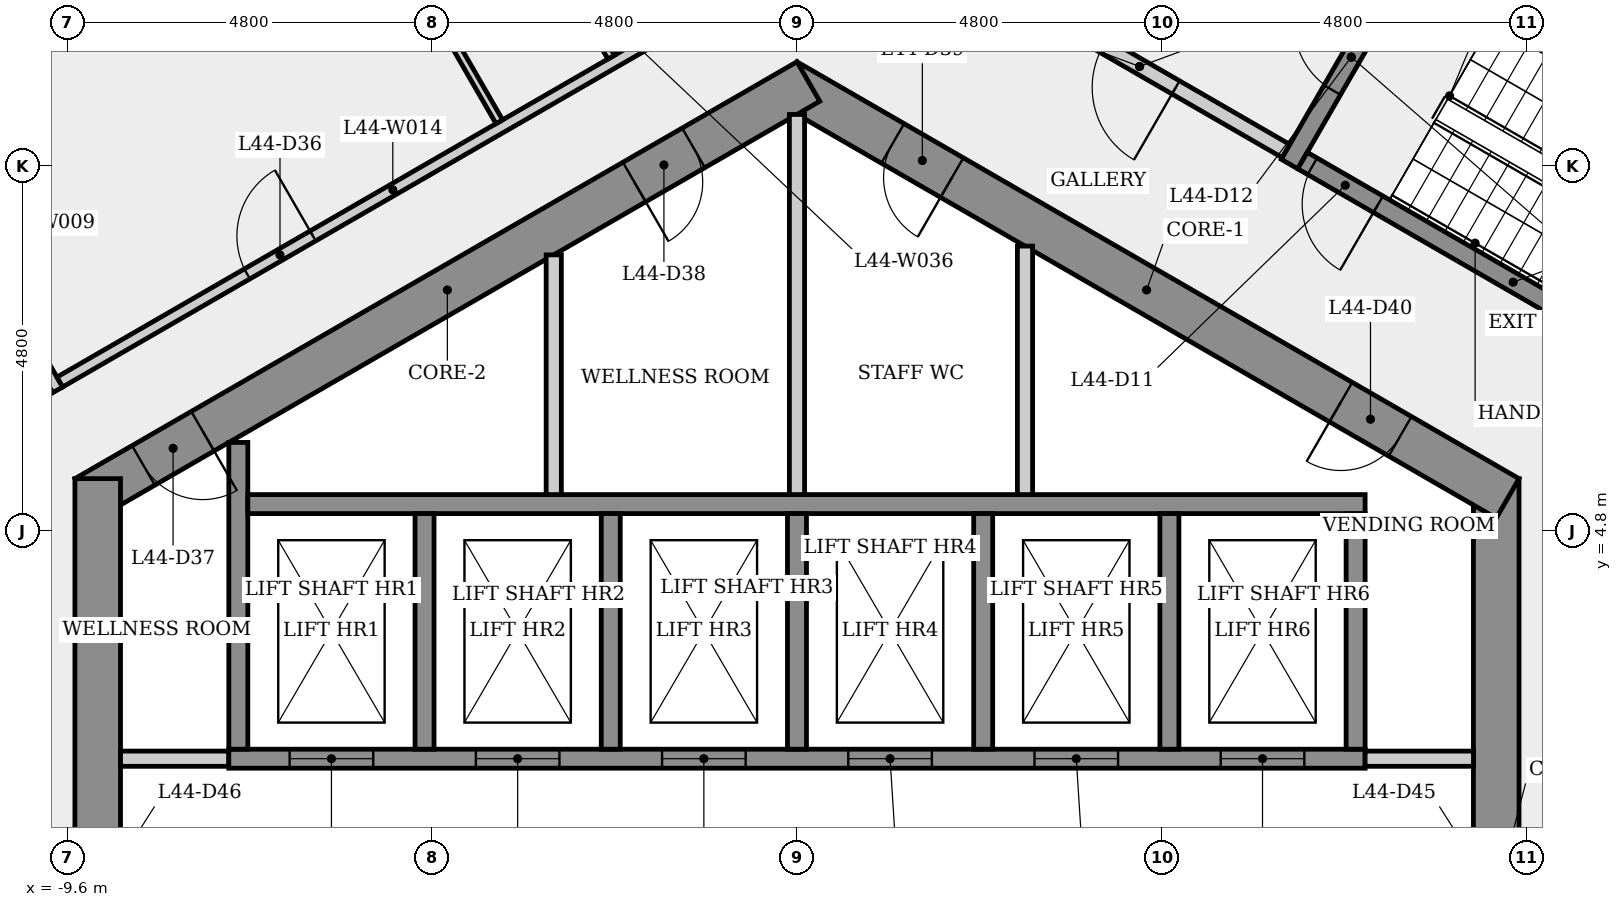
"""IFC4 building model, lengths in metres.
Left out: names, types, materials, properties, quantities, classifications, styles, units other than length and angle.
Written with IfcOpenShell. Run it as: python <this file> out.ifc"""

import sys

from ifc_helpers import new_model, si_unit, direction, frame, frame_2d, origin, place, context, subcontext, project, spatial, rectangle, extrude, element, fill, save


model = new_model("IFC4")
c1 = context("Model", 3, precision=1e-05, world=origin(), true_north=direction((0.0, 1.0)))
c2 = subcontext(c1, "Body", "Model", "MODEL_VIEW")
j1 = project(units=[si_unit("LENGTHUNIT", "METRE"), si_unit("PLANEANGLEUNIT", "RADIAN")], contexts=[c1])
p1 = place(None, origin())
s1 = spatial("IfcSite", under=j1, at=p1, CompositionType="ELEMENT")
p2 = place(p1, origin())
s2 = spatial("IfcBuilding", under=s1, at=p2, CompositionType="ELEMENT")
p3 = place(p2, frame((0.0, 0.0, 166.3)))
s3 = spatial("IfcBuildingStorey", under=s2, at=p3, CompositionType="ELEMENT", Elevation=166.3)
p4 = place(p3, frame((9.2, -5.485, 0.0), z_axis=(0.0, 0.0, 1.0), x_axis=(0.0, 1.0, 0.0)))
e1 = element("IfcWall", 1, at=p4, inside=s3, PredefinedType="SHEAR", context=c2, shape_type="SweptSolid", body=[
    extrude(rectangle(XDim=10.97, YDim=0.6, at=frame_2d((5.485, 0.0))), origin(), (0.0, 0.0, 1.0), 3.4),
])
p5 = place(p4, frame((4.685, 0.0, 0.0)))
e2 = element("IfcOpeningElement", 2, at=p5, cuts=e1, PredefinedType="OPENING", context=c2, shape_type="SweptSolid", body=[
    extrude(rectangle(XDim=1.6, YDim=2.1, at=frame_2d((0.8, 1.05))), frame((0.0, 0.31, 0.0), z_axis=(0.0, -1.0, 0.0), x_axis=(1.0, 0.0, 0.0)), (0.0, 0.0, 1.0), 0.62),
])
p6 = place(p3, frame((9.35, 5.225, 0.0), z_axis=(0.0, 0.0, 1.0), x_axis=(-0.866023993627, 0.500002442456, 0.0)))
e3 = element("IfcWall", 3, at=p6, inside=s3, PredefinedType="SHEAR", context=c2, shape_type="SweptSolid", body=[
    extrude(rectangle(XDim=10.97, YDim=0.6, at=frame_2d((5.485, 0.0))), origin(), (0.0, 0.0, 1.0), 3.4),
])
p7 = place(p6, frame((8.442, 0.0, 0.0)))
e4 = element("IfcOpeningElement", 4, at=p7, cuts=e3, PredefinedType="OPENING", context=c2, shape_type="SweptSolid", body=[
    extrude(rectangle(XDim=0.9, YDim=2.1, at=frame_2d((0.45, 1.05))), frame((0.0, 0.31, 0.0), z_axis=(0.0, -1.0, 0.0), x_axis=(1.0, 0.0, 0.0)), (0.0, 0.0, 1.0), 0.62),
])
p8 = place(p6, frame((1.634, 0.0, 0.0)))
e5 = element("IfcOpeningElement", 5, at=p8, cuts=e3, PredefinedType="OPENING", context=c2, shape_type="SweptSolid", body=[
    extrude(rectangle(XDim=0.9, YDim=2.1, at=frame_2d((0.45, 1.05))), frame((0.0, 0.31, 0.0), z_axis=(0.0, -1.0, 0.0), x_axis=(1.0, 0.0, 0.0)), (0.0, 0.0, 1.0), 0.62),
])
p9 = place(p3, frame((0.15, 10.71, 0.0), z_axis=(0.0, 0.0, 1.0), x_axis=(-0.866023993627, -0.500002442456, 0.0)))
e6 = element("IfcWall", 6, at=p9, inside=s3, PredefinedType="SHEAR", context=c2, shape_type="SweptSolid", body=[
    extrude(rectangle(XDim=10.97, YDim=0.6, at=frame_2d((5.485, 0.0))), origin(), (0.0, 0.0, 1.0), 3.4),
])
p10 = place(p9, frame((9.201, 0.0, 0.0)))
e7 = element("IfcOpeningElement", 7, at=p10, cuts=e6, PredefinedType="OPENING", context=c2, shape_type="SweptSolid", body=[
    extrude(rectangle(XDim=0.9, YDim=2.1, at=frame_2d((0.45, 1.05))), frame((0.0, 0.31, 0.0), z_axis=(0.0, -1.0, 0.0), x_axis=(1.0, 0.0, 0.0)), (0.0, 0.0, 1.0), 0.62),
])
p11 = place(p9, frame((1.744, 0.0, 0.0)))
e8 = element("IfcOpeningElement", 8, at=p11, cuts=e6, PredefinedType="OPENING", context=c2, shape_type="SweptSolid", body=[
    extrude(rectangle(XDim=0.9, YDim=2.1, at=frame_2d((0.45, 1.05))), frame((0.0, 0.31, 0.0), z_axis=(0.0, -1.0, 0.0), x_axis=(1.0, 0.0, 0.0)), (0.0, 0.0, 1.0), 0.62),
])
p12 = place(p3, frame((-9.2, 5.485, 0.0), z_axis=(0.0, 0.0, 1.0), x_axis=(0.0, -1.0, 0.0)))
e9 = element("IfcWall", 9, at=p12, inside=s3, PredefinedType="SHEAR", context=c2, shape_type="SweptSolid", body=[
    extrude(rectangle(XDim=10.97, YDim=0.6, at=frame_2d((5.485, 0.0))), origin(), (0.0, 0.0, 1.0), 3.4),
])
p13 = place(p12, frame((8.516, 0.0, 0.0)))
e10 = element("IfcOpeningElement", 10, at=p13, cuts=e9, PredefinedType="OPENING", context=c2, shape_type="SweptSolid", body=[
    extrude(rectangle(XDim=0.9, YDim=2.1, at=frame_2d((0.45, 1.05))), frame((0.0, 0.31, 0.0), z_axis=(0.0, -1.0, 0.0), x_axis=(1.0, 0.0, 0.0)), (0.0, 0.0, 1.0), 0.62),
])
p14 = place(p12, frame((4.685, 0.0, 0.0)))
e11 = element("IfcOpeningElement", 11, at=p14, cuts=e9, PredefinedType="OPENING", context=c2, shape_type="SweptSolid", body=[
    extrude(rectangle(XDim=1.6, YDim=2.1, at=frame_2d((0.8, 1.05))), frame((0.0, 0.31, 0.0), z_axis=(0.0, -1.0, 0.0), x_axis=(1.0, 0.0, 0.0)), (0.0, 0.0, 1.0), 0.62),
])
p15 = place(p3, frame((-12.257, 11.038, 0.0), z_axis=(0.0, 0.0, 1.0), x_axis=(0.499997969693, -0.866026575979, 0.0)))
e12 = element("IfcWall", 12, at=p15, inside=s3, PredefinedType="PARTITIONING", context=c2, shape_type="SweptSolid", body=[
    extrude(rectangle(XDim=5.062, YDim=0.15, at=frame_2d((2.531, 0.0))), origin(), (0.0, 0.0, 1.0), 3.05),
])
p16 = place(p3, frame((-9.698, 6.756, 0.0), z_axis=(0.0, 0.0, 1.0), x_axis=(0.866026460776, 0.499998169232, 0.0)))
e13 = element("IfcWall", 13, at=p16, inside=s3, PredefinedType="PARTITIONING", context=c2, shape_type="SweptSolid", body=[
    extrude(rectangle(XDim=10.118, YDim=0.15, at=frame_2d((5.059, 0.0))), origin(), (0.0, 0.0, 1.0), 3.05),
])
p17 = place(p16, frame((2.845, 0.0, 0.0)))
e14 = element("IfcOpeningElement", 14, at=p17, cuts=e13, PredefinedType="OPENING", context=c2, shape_type="SweptSolid", body=[
    extrude(rectangle(XDim=1.0, YDim=2.1, at=frame_2d((0.5, 1.05))), frame((0.0, 0.085, 0.0), z_axis=(0.0, -1.0, 0.0), x_axis=(1.0, 0.0, 0.0)), (0.0, 0.0, 1.0), 0.17),
])
p18 = place(p3, frame((-8.9, 1.8, 0.0), z_axis=(0.0, 0.0, 1.0), x_axis=(1.0, 0.0, 0.0)))
e15 = element("IfcWall", 15, at=p18, inside=s3, PredefinedType="PARTITIONING", context=c2, shape_type="SweptSolid", body=[
    extrude(rectangle(XDim=1.425, YDim=0.2, at=frame_2d((0.712, 0.0))), origin(), (0.0, 0.0, 1.0), 3.05),
])
p19 = place(p3, frame((-7.475, 1.8, 0.0), z_axis=(0.0, 0.0, 1.0), x_axis=(1.0, 0.0, 0.0)))
e16 = element("IfcWall", 16, at=p19, inside=s3, PredefinedType="SHEAR", context=c2, shape_type="SweptSolid", body=[
    extrude(rectangle(XDim=14.95, YDim=0.25, at=frame_2d((7.475, 0.0))), origin(), (0.0, 0.0, 1.0), 3.05),
])
p20 = place(p19, frame((0.8, 0.0, 0.0)))
e17 = element("IfcOpeningElement", 17, at=p20, cuts=e16, PredefinedType="OPENING", context=c2, shape_type="SweptSolid", body=[
    extrude(rectangle(XDim=1.1, YDim=2.1, at=frame_2d((0.55, 1.05))), frame((0.0, 0.135, 0.0), z_axis=(0.0, -1.0, 0.0), x_axis=(1.0, 0.0, 0.0)), (0.0, 0.0, 1.0), 0.27),
])
p21 = place(p19, frame((3.25, 0.0, 0.0)))
e18 = element("IfcOpeningElement", 18, at=p21, cuts=e16, PredefinedType="OPENING", context=c2, shape_type="SweptSolid", body=[
    extrude(rectangle(XDim=1.1, YDim=2.1, at=frame_2d((0.55, 1.05))), frame((0.0, 0.135, 0.0), z_axis=(0.0, -1.0, 0.0), x_axis=(1.0, 0.0, 0.0)), (0.0, 0.0, 1.0), 0.27),
])
p22 = place(p19, frame((5.7, 0.0, 0.0)))
e19 = element("IfcOpeningElement", 19, at=p22, cuts=e16, PredefinedType="OPENING", context=c2, shape_type="SweptSolid", body=[
    extrude(rectangle(XDim=1.1, YDim=2.1, at=frame_2d((0.55, 1.05))), frame((0.0, 0.135, 0.0), z_axis=(0.0, -1.0, 0.0), x_axis=(1.0, 0.0, 0.0)), (0.0, 0.0, 1.0), 0.27),
])
p23 = place(p19, frame((8.15, 0.0, 0.0)))
e20 = element("IfcOpeningElement", 20, at=p23, cuts=e16, PredefinedType="OPENING", context=c2, shape_type="SweptSolid", body=[
    extrude(rectangle(XDim=1.1, YDim=2.1, at=frame_2d((0.55, 1.05))), frame((0.0, 0.135, 0.0), z_axis=(0.0, -1.0, 0.0), x_axis=(1.0, 0.0, 0.0)), (0.0, 0.0, 1.0), 0.27),
])
p24 = place(p19, frame((10.6, 0.0, 0.0)))
e21 = element("IfcOpeningElement", 21, at=p24, cuts=e16, PredefinedType="OPENING", context=c2, shape_type="SweptSolid", body=[
    extrude(rectangle(XDim=1.1, YDim=2.1, at=frame_2d((0.55, 1.05))), frame((0.0, 0.135, 0.0), z_axis=(0.0, -1.0, 0.0), x_axis=(1.0, 0.0, 0.0)), (0.0, 0.0, 1.0), 0.27),
])
p25 = place(p19, frame((13.05, 0.0, 0.0)))
e22 = element("IfcOpeningElement", 22, at=p25, cuts=e16, PredefinedType="OPENING", context=c2, shape_type="SweptSolid", body=[
    extrude(rectangle(XDim=1.1, YDim=2.1, at=frame_2d((0.55, 1.05))), frame((0.0, 0.135, 0.0), z_axis=(0.0, -1.0, 0.0), x_axis=(1.0, 0.0, 0.0)), (0.0, 0.0, 1.0), 0.27),
])
p26 = place(p3, frame((-7.35, 1.925, 0.0), z_axis=(0.0, 0.0, 1.0), x_axis=(0.0, 1.0, 0.0)))
e23 = element("IfcWall", 23, at=p26, inside=s3, PredefinedType="SHEAR", context=c2, shape_type="SweptSolid", body=[
    extrude(rectangle(XDim=4.036, YDim=0.25, at=frame_2d((2.018, 0.0))), origin(), (0.0, 0.0, 1.0), 3.05),
])
p27 = place(p3, frame((-7.225, 5.15, 0.0), z_axis=(0.0, 0.0, 1.0), x_axis=(1.0, 0.0, 0.0)))
e24 = element("IfcWall", 24, at=p27, inside=s3, PredefinedType="SHEAR", context=c2, shape_type="SweptSolid", body=[
    extrude(rectangle(XDim=14.7, YDim=0.25, at=frame_2d((7.35, 0.0))), origin(), (0.0, 0.0, 1.0), 3.05),
])
p28 = place(p3, frame((-4.9, 5.025, 0.0), z_axis=(0.0, 0.0, 1.0), x_axis=(0.0, -1.0, 0.0)))
e25 = element("IfcWall", 25, at=p28, inside=s3, PredefinedType="SHEAR", context=c2, shape_type="SweptSolid", body=[
    extrude(rectangle(XDim=3.1, YDim=0.25, at=frame_2d((1.55, 0.0))), origin(), (0.0, 0.0, 1.0), 3.4),
])
p29 = place(p3, frame((-3.916, 10.181, 0.0), z_axis=(0.0, 0.0, 1.0), x_axis=(-0.500011399757, 0.866018822032, 0.0)))
e26 = element("IfcWall", 26, at=p29, inside=s3, PredefinedType="PARTITIONING", context=c2, shape_type="SweptSolid", body=[
    extrude(rectangle(XDim=7.411, YDim=0.1, at=frame_2d((3.706, 0.0))), origin(), (0.0, 0.0, 1.0), 3.05),
])
p30 = place(p3, frame((-3.632, 13.088, 0.0), z_axis=(0.0, 0.0, 1.0), x_axis=(0.499986429846, -0.866033238375, 0.0)))
e27 = element("IfcWall", 27, at=p30, inside=s3, PredefinedType="PARTITIONING", context=c2, shape_type="SweptSolid", body=[
    extrude(rectangle(XDim=2.375, YDim=0.1, at=frame_2d((1.188, 0.0))), origin(), (0.0, 0.0, 1.0), 3.05),
])
p31 = place(p30, frame((0.812, 0.0, 0.0)))
e28 = element("IfcOpeningElement", 28, at=p31, cuts=e27, PredefinedType="OPENING", context=c2, shape_type="SweptSolid", body=[
    extrude(rectangle(XDim=0.8, YDim=2.1, at=frame_2d((0.4, 1.05))), frame((0.0, 0.06, 0.0), z_axis=(0.0, -1.0, 0.0), x_axis=(1.0, 0.0, 0.0)), (0.0, 0.0, 1.0), 0.12),
])
p32 = place(p3, frame((-3.2, 8.429, 0.0), z_axis=(0.0, 0.0, 1.0), x_axis=(0.0, -1.0, 0.0)))
e29 = element("IfcWall", 29, at=p32, inside=s3, PredefinedType="PARTITIONING", context=c2, shape_type="SweptSolid", body=[
    extrude(rectangle(XDim=3.154, YDim=0.2, at=frame_2d((1.577, 0.0))), origin(), (0.0, 0.0, 1.0), 3.05),
])
for number, where, z_axis, x_axis in (
    (30, (-2.45, 5.025, 0.0), (0.0, 0.0, 1.0), (0.0, -1.0, 0.0)),
    (31, (0.0, 5.025, 0.0), (0.0, 0.0, 1.0), (0.0, -1.0, 0.0)),
):
    element("IfcWall", number, at=place(p3, frame(where, z_axis=z_axis, x_axis=x_axis)), inside=s3, PredefinedType="SHEAR", context=c2, shape_type="SweptSolid", body=[
        extrude(rectangle(XDim=3.1, YDim=0.25, at=frame_2d((1.55, 0.0))), origin(), (0.0, 0.0, 1.0), 3.4),
    ])
p33 = place(p3, frame((0.0, 10.277, 0.0), z_axis=(0.0, 0.0, 1.0), x_axis=(0.0, -1.0, 0.0)))
e32 = element("IfcWall", 32, at=p33, inside=s3, PredefinedType="PARTITIONING", context=c2, shape_type="SweptSolid", body=[
    extrude(rectangle(XDim=5.002, YDim=0.2, at=frame_2d((2.501, 0.0))), origin(), (0.0, 0.0, 1.0), 3.05),
])
p34 = place(p3, frame((2.45, 5.025, 0.0), z_axis=(0.0, 0.0, 1.0), x_axis=(0.0, -1.0, 0.0)))
e33 = element("IfcWall", 33, at=p34, inside=s3, PredefinedType="SHEAR", context=c2, shape_type="SweptSolid", body=[
    extrude(rectangle(XDim=3.1, YDim=0.25, at=frame_2d((1.55, 0.0))), origin(), (0.0, 0.0, 1.0), 3.4),
])
p35 = place(p3, frame((3.0, 8.545, 0.0), z_axis=(0.0, 0.0, 1.0), x_axis=(0.0, -1.0, 0.0)))
e34 = element("IfcWall", 34, at=p35, inside=s3, PredefinedType="PARTITIONING", context=c2, shape_type="SweptSolid", body=[
    extrude(rectangle(XDim=3.27, YDim=0.2, at=frame_2d((1.635, 0.0))), origin(), (0.0, 0.0, 1.0), 3.05),
])
p36 = place(p3, frame((4.9, 5.025, 0.0), z_axis=(0.0, 0.0, 1.0), x_axis=(0.0, -1.0, 0.0)))
e35 = element("IfcWall", 35, at=p36, inside=s3, PredefinedType="SHEAR", context=c2, shape_type="SweptSolid", body=[
    extrude(rectangle(XDim=3.1, YDim=0.25, at=frame_2d((1.55, 0.0))), origin(), (0.0, 0.0, 1.0), 3.4),
])
p37 = place(p3, frame((6.435, 9.795, 0.0), z_axis=(0.0, 0.0, 1.0), x_axis=(-0.866012907634, 0.500021643343, 0.0)))
e36 = element("IfcWall", 36, at=p37, inside=s3, PredefinedType="PARTITIONING", context=c2, shape_type="SweptSolid", body=[
    extrude(rectangle(XDim=4.45, YDim=0.2, at=frame_2d((2.225, 0.0))), origin(), (0.0, 0.0, 1.0), 3.05),
])
p38 = place(p37, frame((1.675, 0.0, 0.0)))
e37 = element("IfcOpeningElement", 37, at=p38, cuts=e36, PredefinedType="OPENING", context=c2, shape_type="SweptSolid", body=[
    extrude(rectangle(XDim=1.1, YDim=2.1, at=frame_2d((0.55, 1.05))), frame((0.0, 0.11, 0.0), z_axis=(0.0, -1.0, 0.0), x_axis=(1.0, 0.0, 0.0)), (0.0, 0.0, 1.0), 0.22),
])
p39 = place(p3, frame((6.48, 9.624, 0.0), z_axis=(0.0, 0.0, 1.0), x_axis=(0.500017246033, 0.866015446554, 0.0)))
e38 = element("IfcWall", 38, at=p39, inside=s3, PredefinedType="SHEAR", context=c2, shape_type="SweptSolid", body=[
    extrude(rectangle(XDim=3.25, YDim=0.25, at=frame_2d((1.625, 0.0))), origin(), (0.0, 0.0, 1.0), 3.05),
])
p40 = place(p39, frame((1.125, 0.0, 0.0)))
e39 = element("IfcOpeningElement", 39, at=p40, cuts=e38, PredefinedType="OPENING", context=c2, shape_type="SweptSolid", body=[
    extrude(rectangle(XDim=1.0, YDim=2.1, at=frame_2d((0.5, 1.05))), frame((0.0, 0.135, 0.0), z_axis=(0.0, -1.0, 0.0), x_axis=(1.0, 0.0, 0.0)), (0.0, 0.0, 1.0), 0.27),
])
p41 = place(p3, frame((7.475, 1.8, 0.0), z_axis=(0.0, 0.0, 1.0), x_axis=(1.0, 0.0, 0.0)))
e40 = element("IfcWall", 40, at=p41, inside=s3, PredefinedType="PARTITIONING", context=c2, shape_type="SweptSolid", body=[
    extrude(rectangle(XDim=1.425, YDim=0.2, at=frame_2d((0.712, 0.0))), origin(), (0.0, 0.0, 1.0), 3.05),
])
p42 = place(p3, frame((7.35, 5.025, 0.0), z_axis=(0.0, 0.0, 1.0), x_axis=(0.0, -1.0, 0.0)))
e41 = element("IfcWall", 41, at=p42, inside=s3, PredefinedType="SHEAR", context=c2, shape_type="SweptSolid", body=[
    extrude(rectangle(XDim=3.1, YDim=0.25, at=frame_2d((1.55, 0.0))), origin(), (0.0, 0.0, 1.0), 3.4),
])
p43 = place(p3, frame((8.151, 12.268, 0.0), z_axis=(0.0, 0.0, 1.0), x_axis=(0.866025499775, -0.499999833739, 0.0)))
e42 = element("IfcWall", 42, at=p43, inside=s3, PredefinedType="SHEAR", context=c2, shape_type="SweptSolid", body=[
    extrude(rectangle(XDim=6.4, YDim=0.25, at=frame_2d((3.2, 0.0))), origin(), (0.0, 0.0, 1.0), 3.05),
])
p44 = place(p3, frame((12.194, 6.47, 0.0), z_axis=(0.0, 0.0, 1.0), x_axis=(-0.866025499775, 0.499999833739, 0.0)))
e43 = element("IfcWall", 43, at=p44, inside=s3, PredefinedType="SHEAR", context=c2, shape_type="SweptSolid", body=[
    extrude(rectangle(XDim=6.4, YDim=0.25, at=frame_2d((3.2, 0.0))), origin(), (0.0, 0.0, 1.0), 3.05),
])
p45 = place(p44, frame((5.25, 0.0, 0.0)))
e44 = element("IfcOpeningElement", 44, at=p45, cuts=e43, PredefinedType="OPENING", context=c2, shape_type="SweptSolid", body=[
    extrude(rectangle(XDim=1.0, YDim=2.1, at=frame_2d((0.5, 1.05))), frame((0.0, 0.135, 0.0), z_axis=(0.0, -1.0, 0.0), x_axis=(1.0, 0.0, 0.0)), (0.0, 0.0, 1.0), 0.27),
])
p46 = place(p20, origin())
e45 = element("IfcDoor", 45, at=p46, inside=s3, OperationType="SLIDING_TO_LEFT", PredefinedType="DOOR", context=c2, shape_type="SweptSolid", body=[
    extrude(rectangle(XDim=1.1, YDim=2.1, at=frame_2d((0.55, 1.05))), frame((0.0, 0.025, 0.0), z_axis=(0.0, -1.0, 0.0), x_axis=(1.0, 0.0, 0.0)), (0.0, 0.0, 1.0), 0.05),
])
fill(e17, e45)
p47 = place(p21, origin())
e46 = element("IfcDoor", 46, at=p47, inside=s3, OperationType="SLIDING_TO_LEFT", PredefinedType="DOOR", context=c2, shape_type="SweptSolid", body=[
    extrude(rectangle(XDim=1.1, YDim=2.1, at=frame_2d((0.55, 1.05))), frame((0.0, 0.025, 0.0), z_axis=(0.0, -1.0, 0.0), x_axis=(1.0, 0.0, 0.0)), (0.0, 0.0, 1.0), 0.05),
])
fill(e18, e46)
p48 = place(p22, origin())
e47 = element("IfcDoor", 47, at=p48, inside=s3, OperationType="SLIDING_TO_LEFT", PredefinedType="DOOR", context=c2, shape_type="SweptSolid", body=[
    extrude(rectangle(XDim=1.1, YDim=2.1, at=frame_2d((0.55, 1.05))), frame((0.0, 0.025, 0.0), z_axis=(0.0, -1.0, 0.0), x_axis=(1.0, 0.0, 0.0)), (0.0, 0.0, 1.0), 0.05),
])
fill(e19, e47)
p49 = place(p23, origin())
e48 = element("IfcDoor", 48, at=p49, inside=s3, OperationType="SLIDING_TO_LEFT", PredefinedType="DOOR", context=c2, shape_type="SweptSolid", body=[
    extrude(rectangle(XDim=1.1, YDim=2.1, at=frame_2d((0.55, 1.05))), frame((0.0, 0.025, 0.0), z_axis=(0.0, -1.0, 0.0), x_axis=(1.0, 0.0, 0.0)), (0.0, 0.0, 1.0), 0.05),
])
fill(e20, e48)
p50 = place(p24, origin())
e49 = element("IfcDoor", 49, at=p50, inside=s3, OperationType="SLIDING_TO_LEFT", PredefinedType="DOOR", context=c2, shape_type="SweptSolid", body=[
    extrude(rectangle(XDim=1.1, YDim=2.1, at=frame_2d((0.55, 1.05))), frame((0.0, 0.025, 0.0), z_axis=(0.0, -1.0, 0.0), x_axis=(1.0, 0.0, 0.0)), (0.0, 0.0, 1.0), 0.05),
])
fill(e21, e49)
p51 = place(p25, origin())
e50 = element("IfcDoor", 50, at=p51, inside=s3, OperationType="SLIDING_TO_LEFT", PredefinedType="DOOR", context=c2, shape_type="SweptSolid", body=[
    extrude(rectangle(XDim=1.1, YDim=2.1, at=frame_2d((0.55, 1.05))), frame((0.0, 0.025, 0.0), z_axis=(0.0, -1.0, 0.0), x_axis=(1.0, 0.0, 0.0)), (0.0, 0.0, 1.0), 0.05),
])
fill(e22, e50)
p52 = place(p45, origin())
e51 = element("IfcDoor", 51, at=p52, inside=s3, OperationType="SINGLE_SWING_LEFT", PredefinedType="DOOR", context=c2, shape_type="SweptSolid", body=[
    extrude(rectangle(XDim=1.0, YDim=2.1, at=frame_2d((0.5, 1.05))), frame((0.0, 0.025, 0.0), z_axis=(0.0, -1.0, 0.0), x_axis=(1.0, 0.0, 0.0)), (0.0, 0.0, 1.0), 0.05),
])
fill(e44, e51)
p53 = place(p40, origin())
e52 = element("IfcDoor", 52, at=p53, inside=s3, OperationType="SINGLE_SWING_RIGHT", PredefinedType="DOOR", context=c2, shape_type="SweptSolid", body=[
    extrude(rectangle(XDim=1.0, YDim=2.1, at=frame_2d((0.5, 1.05))), frame((0.0, 0.025, 0.0), z_axis=(0.0, -1.0, 0.0), x_axis=(1.0, 0.0, 0.0)), (0.0, 0.0, 1.0), 0.05),
])
fill(e39, e52)
p54 = place(p38, origin())
e53 = element("IfcDoor", 53, at=p54, inside=s3, OperationType="SINGLE_SWING_LEFT", PredefinedType="DOOR", context=c2, shape_type="SweptSolid", body=[
    extrude(rectangle(XDim=1.1, YDim=2.1, at=frame_2d((0.55, 1.05))), frame((0.0, 0.025, 0.0), z_axis=(0.0, -1.0, 0.0), x_axis=(1.0, 0.0, 0.0)), (0.0, 0.0, 1.0), 0.05),
])
fill(e37, e53)
p55 = place(p17, origin())
e54 = element("IfcDoor", 54, at=p55, inside=s3, OperationType="SINGLE_SWING_RIGHT", PredefinedType="DOOR", context=c2, shape_type="SweptSolid", body=[
    extrude(rectangle(XDim=1.0, YDim=2.1, at=frame_2d((0.5, 1.05))), frame((0.0, 0.025, 0.0), z_axis=(0.0, -1.0, 0.0), x_axis=(1.0, 0.0, 0.0)), (0.0, 0.0, 1.0), 0.05),
])
fill(e14, e54)
p56 = place(p10, origin())
e55 = element("IfcDoor", 55, at=p56, inside=s3, OperationType="SINGLE_SWING_LEFT", PredefinedType="DOOR", context=c2, shape_type="SweptSolid", body=[
    extrude(rectangle(XDim=0.9, YDim=2.1, at=frame_2d((0.45, 1.05))), frame((0.0, 0.025, 0.0), z_axis=(0.0, -1.0, 0.0), x_axis=(1.0, 0.0, 0.0)), (0.0, 0.0, 1.0), 0.05),
])
fill(e7, e55)
p57 = place(p11, origin())
e56 = element("IfcDoor", 56, at=p57, inside=s3, OperationType="SINGLE_SWING_RIGHT", PredefinedType="DOOR", context=c2, shape_type="SweptSolid", body=[
    extrude(rectangle(XDim=0.9, YDim=2.1, at=frame_2d((0.45, 1.05))), frame((0.0, 0.025, 0.0), z_axis=(0.0, -1.0, 0.0), x_axis=(1.0, 0.0, 0.0)), (0.0, 0.0, 1.0), 0.05),
])
fill(e8, e56)
p58 = place(p7, origin())
e57 = element("IfcDoor", 57, at=p58, inside=s3, OperationType="SINGLE_SWING_LEFT", PredefinedType="DOOR", context=c2, shape_type="SweptSolid", body=[
    extrude(rectangle(XDim=0.9, YDim=2.1, at=frame_2d((0.45, 1.05))), frame((0.0, 0.025, 0.0), z_axis=(0.0, -1.0, 0.0), x_axis=(1.0, 0.0, 0.0)), (0.0, 0.0, 1.0), 0.05),
])
fill(e4, e57)
p59 = place(p8, origin())
e58 = element("IfcDoor", 58, at=p59, inside=s3, OperationType="SINGLE_SWING_RIGHT", PredefinedType="DOOR", context=c2, shape_type="SweptSolid", body=[
    extrude(rectangle(XDim=0.9, YDim=2.1, at=frame_2d((0.45, 1.05))), frame((0.0, 0.025, 0.0), z_axis=(0.0, -1.0, 0.0), x_axis=(1.0, 0.0, 0.0)), (0.0, 0.0, 1.0), 0.05),
])
fill(e5, e58)
save(model, sys.argv[1])
